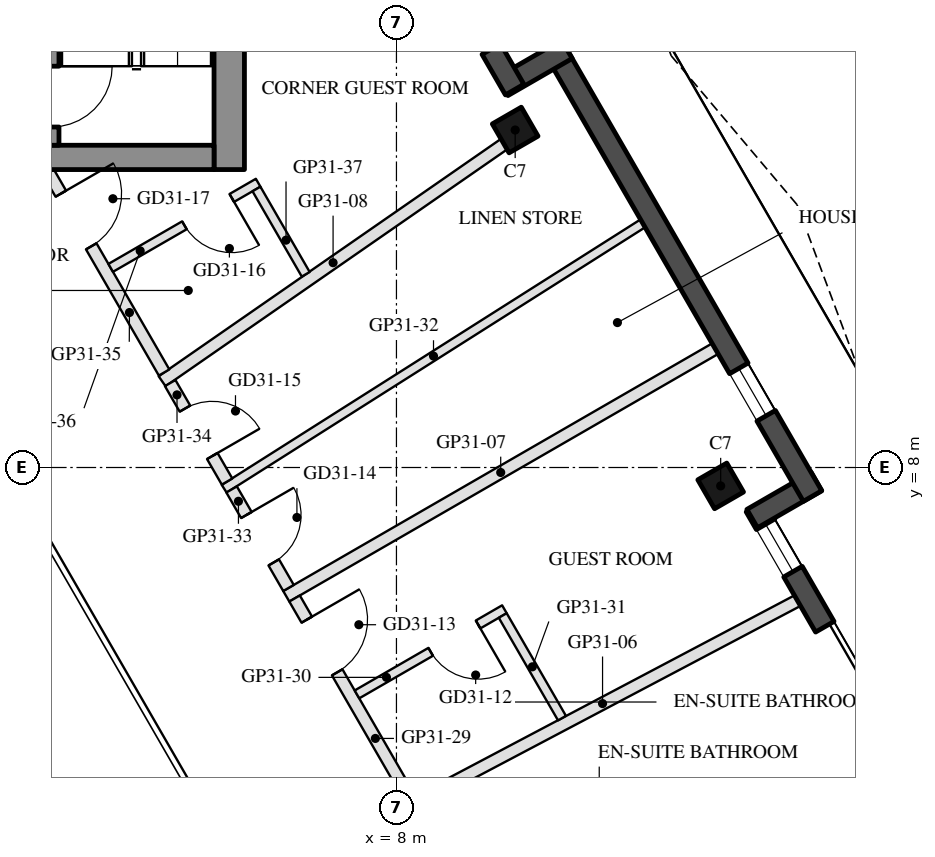
"""IFC4 building model, lengths in metres.
Left out: names, types, materials, properties, quantities, classifications, styles, units other than length and angle.
Written with IfcOpenShell. Run it as: python <this file> out.ifc"""

import sys

from ifc_helpers import new_model, si_unit, direction, frame, frame_2d, origin, origin_2d, place, context, subcontext, project, spatial, rectangle, hollow_rectangle, extrude, boolean, halfspace, element, fill, save


model = new_model("IFC4")
c1 = context("Model", 3, precision=1e-05, world=origin(), true_north=direction((0.0, 1.0)))
c2 = subcontext(c1, "Body", "Model", "MODEL_VIEW")
j1 = project(units=[si_unit("LENGTHUNIT", "METRE"), si_unit("PLANEANGLEUNIT", "RADIAN")], contexts=[c1])
p1 = place(None, origin())
s1 = spatial("IfcSite", under=j1, at=p1, CompositionType="ELEMENT")
p2 = place(p1, origin())
s2 = spatial("IfcBuilding", under=s1, at=p2, CompositionType="ELEMENT")
p3 = place(p2, frame((0.0, 0.0, 305.9)))
s3 = spatial("IfcBuildingStorey", under=s2, at=p3, CompositionType="ELEMENT", Elevation=305.9)
p4 = place(p3, frame((13.332, 7.697, 0.0), z_axis=(0.0, 0.0, 1.0), x_axis=(-0.5, 0.866025403784, 0.0)))
e1 = element("IfcColumn", 1, at=p4, inside=s3, PredefinedType="COLUMN", context=c2, shape_type="SweptSolid", body=[
    boolean("DIFFERENCE", extrude(hollow_rectangle(XDim=0.55, YDim=0.55, WallThickness=0.025, at=origin_2d()), origin(), (0.0, 0.0, 1.0), 3.7), halfspace(frame((0.0, 0.0, 3.669), z_axis=(0.0, 0.0, 1.0), x_axis=(1.0, 0.0, 0.0)), False)),
])
p5 = place(p3, frame((9.953, 13.551, 0.0), z_axis=(0.0, 0.0, 1.0), x_axis=(-0.5, 0.866025403784, 0.0)))
e2 = element("IfcColumn", 2, at=p5, inside=s3, PredefinedType="COLUMN", context=c2, shape_type="SweptSolid", body=[
    boolean("DIFFERENCE", extrude(hollow_rectangle(XDim=0.55, YDim=0.55, WallThickness=0.025, at=origin_2d()), origin(), (0.0, 0.0, 1.0), 3.7), halfspace(frame((0.0, 0.0, 3.666), z_axis=(0.0, 0.0, 1.0), x_axis=(1.0, 0.0, 0.0)), False)),
])
p6 = place(p3, frame((16.703, 2.509, 0.0), z_axis=(0.0, 0.0, 1.0), x_axis=(-0.499975351079, 0.866039634378, 0.0)))
e3 = element("IfcWall", 3, at=p6, inside=s3, PredefinedType="SOLIDWALL", context=c2, shape_type="SweptSolid", body=[
    extrude(rectangle(XDim=5.599, YDim=0.35, at=frame_2d((2.799, 0.0))), origin(), (0.0, 0.0, 1.0), 3.55),
])
p7 = place(p6, frame((0.917, 0.0, 0.0)))
e4 = element("IfcOpeningElement", 4, at=p7, cuts=e3, PredefinedType="OPENING", context=c2, shape_type="SweptSolid", body=[
    extrude(rectangle(XDim=2.4, YDim=2.4, at=frame_2d((1.2, 1.2))), frame((0.0, 0.185, 0.0), z_axis=(0.0, -1.0, 0.0), x_axis=(1.0, 0.0, 0.0)), (0.0, 0.0, 1.0), 0.37),
])
p8 = place(p6, frame((4.363, 0.0, 0.3)))
e5 = element("IfcOpeningElement", 5, at=p8, cuts=e3, PredefinedType="OPENING", context=c2, shape_type="SweptSolid", body=[
    extrude(rectangle(XDim=0.9, YDim=2.65, at=frame_2d((0.45, 1.325))), frame((0.0, 0.185, 0.0), z_axis=(0.0, -1.0, 0.0), x_axis=(1.0, 0.0, 0.0)), (0.0, 0.0, 1.0), 0.37),
])
p9 = place(p3, frame((13.85, 7.159, 0.0), z_axis=(0.0, 0.0, 1.0), x_axis=(0.866005645448, 0.500034220881, 0.0)))
e6 = element("IfcWall", 6, at=p9, inside=s3, PredefinedType="SOLIDWALL", context=c2, shape_type="SweptSolid", body=[
    extrude(rectangle(XDim=1.22, YDim=0.35, at=frame_2d((0.61, 0.0))), origin(), (0.0, 0.0, 1.0), 3.55),
])
p10 = place(p3, frame((14.843, 7.531, 0.0), z_axis=(0.0, 0.0, 1.0), x_axis=(-0.500013816581, 0.866017426631, 0.0)))
e7 = element("IfcWall", 7, at=p10, inside=s3, PredefinedType="SOLIDWALL", context=c2, shape_type="SweptSolid", body=[
    extrude(rectangle(XDim=8.559, YDim=0.35, at=frame_2d((4.279, 0.0))), origin(), (0.0, 0.0, 1.0), 3.55),
])
p11 = place(p10, frame((1.525, 0.0, 0.3)))
e8 = element("IfcOpeningElement", 8, at=p11, cuts=e7, PredefinedType="OPENING", context=c2, shape_type="SweptSolid", body=[
    extrude(rectangle(XDim=0.9, YDim=2.65, at=frame_2d((0.45, 1.325))), frame((0.0, 0.185, 0.0), z_axis=(0.0, -1.0, 0.0), x_axis=(1.0, 0.0, 0.0)), (0.0, 0.0, 1.0), 0.37),
])
p12 = place(p3, frame((10.802, 14.879, 0.0), z_axis=(0.0, 0.0, 1.0), x_axis=(-0.866005645448, -0.500034220881, 0.0)))
e9 = element("IfcWall", 9, at=p12, inside=s3, PredefinedType="SOLIDWALL", context=c2, shape_type="SweptSolid", body=[
    extrude(rectangle(XDim=1.22, YDim=0.35, at=frame_2d((0.61, 0.0))), origin(), (0.0, 0.0, 1.0), 3.55),
])
p13 = place(p3, frame((9.944, 14.216, 0.0), z_axis=(0.0, 0.0, 1.0), x_axis=(-0.500026936782, 0.866009851268, 0.0)))
e10 = element("IfcWall", 10, at=p13, inside=s3, PredefinedType="SOLIDWALL", context=c2, shape_type="SweptSolid", body=[
    extrude(rectangle(XDim=5.599, YDim=0.35, at=frame_2d((2.799, 0.0))), origin(), (0.0, 0.0, 1.0), 3.55),
])
p14 = place(p13, frame((0.77, 0.0, 0.0)))
e11 = element("IfcOpeningElement", 11, at=p14, cuts=e10, PredefinedType="OPENING", context=c2, shape_type="SweptSolid", body=[
    extrude(rectangle(XDim=2.4, YDim=2.4, at=frame_2d((1.2, 1.2))), frame((0.0, 0.185, 0.0), z_axis=(0.0, -1.0, 0.0), x_axis=(1.0, 0.0, 0.0)), (0.0, 0.0, 1.0), 0.37),
])
p15 = place(p13, frame((3.47, 0.0, 0.3)))
e12 = element("IfcOpeningElement", 12, at=p15, cuts=e10, PredefinedType="OPENING", context=c2, shape_type="SweptSolid", body=[
    extrude(rectangle(XDim=1.8, YDim=2.65, at=frame_2d((0.9, 1.325))), frame((0.0, 0.185, 0.0), z_axis=(0.0, -1.0, 0.0), x_axis=(1.0, 0.0, 0.0)), (0.0, 0.0, 1.0), 0.37),
])
p16 = place(p3, frame((5.25, 12.9, 0.0), z_axis=(0.0, 0.0, 1.0), x_axis=(0.0, 1.0, 0.0)))
e13 = element("IfcWall", 13, at=p16, inside=s3, PredefinedType="SHEAR", context=c2, shape_type="SweptSolid", body=[
    extrude(rectangle(XDim=10.299, YDim=0.5, at=frame_2d((5.149, 0.0))), origin(), (0.0, 0.0, 1.0), 3.5),
])
p17 = place(p3, frame((5.0, 13.1, 0.0), z_axis=(0.0, 0.0, 1.0), x_axis=(-1.0, 0.0, 0.0)))
e14 = element("IfcWall", 14, at=p17, inside=s3, PredefinedType="SHEAR", context=c2, shape_type="SweptSolid", body=[
    extrude(rectangle(XDim=10.0, YDim=0.4, at=frame_2d((5.0, 0.0))), origin(), (0.0, 0.0, 1.0), 3.5),
])
p18 = place(p17, frame((3.55, 0.0, 0.0)))
e15 = element("IfcOpeningElement", 15, at=p18, cuts=e14, PredefinedType="OPENING", context=c2, shape_type="SweptSolid", body=[
    extrude(rectangle(XDim=1.1, YDim=2.1, at=frame_2d((0.55, 1.05))), frame((0.0, 0.21, 0.0), z_axis=(0.0, -1.0, 0.0), x_axis=(1.0, 0.0, 0.0)), (0.0, 0.0, 1.0), 0.42),
])
p19 = place(p17, frame((5.85, 0.0, 0.0)))
e16 = element("IfcOpeningElement", 16, at=p19, cuts=e14, PredefinedType="OPENING", context=c2, shape_type="SweptSolid", body=[
    extrude(rectangle(XDim=1.4, YDim=2.1, at=frame_2d((0.7, 1.05))), frame((0.0, 0.21, 0.0), z_axis=(0.0, -1.0, 0.0), x_axis=(1.0, 0.0, 0.0)), (0.0, 0.0, 1.0), 0.42),
])
p20 = place(p3, frame((2.325, 13.3, 0.0), z_axis=(0.0, 0.0, 1.0), x_axis=(0.0, 1.0, 0.0)))
e17 = element("IfcWall", 17, at=p20, inside=s3, PredefinedType="SHEAR", context=c2, shape_type="SweptSolid", body=[
    extrude(rectangle(XDim=6.45, YDim=0.25, at=frame_2d((3.225, 0.0))), origin(), (0.0, 0.0, 1.0), 3.5),
])
p21 = place(p20, frame((0.3, 0.0, 0.0)))
e18 = element("IfcOpeningElement", 18, at=p21, cuts=e17, PredefinedType="OPENING", context=c2, shape_type="SweptSolid", body=[
    extrude(rectangle(XDim=1.0, YDim=2.1, at=frame_2d((0.5, 1.05))), frame((0.0, 0.135, 0.0), z_axis=(0.0, -1.0, 0.0), x_axis=(1.0, 0.0, 0.0)), (0.0, 0.0, 1.0), 0.27),
])
p22 = place(p3, frame((14.595, 5.81, 0.0), z_axis=(0.0, 0.0, 1.0), x_axis=(-0.884286267242, -0.46694517619, 0.0)))
e19 = element("IfcWall", 19, at=p22, inside=s3, PredefinedType="PARTITIONING", context=c2, shape_type="SweptSolid", body=[
    extrude(rectangle(XDim=7.25, YDim=0.2, at=frame_2d((3.625, 0.0))), origin(), (0.0, 0.0, 1.0), 3.1),
])
p23 = place(p3, frame((13.241, 9.954, 0.0), z_axis=(0.0, 0.0, 1.0), x_axis=(-0.866028345359, -0.499994905008, 0.0)))
e20 = element("IfcWall", 20, at=p23, inside=s3, PredefinedType="PARTITIONING", context=c2, shape_type="SweptSolid", body=[
    extrude(rectangle(XDim=8.145, YDim=0.2, at=frame_2d((4.072, 0.0))), origin(), (0.0, 0.0, 1.0), 3.1),
])
p24 = place(p3, frame((9.769, 13.318, 0.0), z_axis=(0.0, 0.0, 1.0), x_axis=(-0.821728251777, -0.569879531332, 0.0)))
e21 = element("IfcWall", 21, at=p24, inside=s3, PredefinedType="PARTITIONING", context=c2, shape_type="SweptSolid", body=[
    extrude(rectangle(XDim=6.843, YDim=0.2, at=frame_2d((3.421, 0.0))), origin(), (0.0, 0.0, 1.0), 3.1),
])
p25 = place(p3, frame((6.325, 5.845, 0.0), z_axis=(0.0, 0.0, 1.0), x_axis=(0.499971120268, -0.866042076863, 0.0)))
e22 = element("IfcWall", 22, at=p25, inside=s3, PredefinedType="PARTITIONING", context=c2, shape_type="SweptSolid", body=[
    extrude(rectangle(XDim=3.796, YDim=0.2, at=frame_2d((1.898, 0.0))), origin(), (0.0, 0.0, 1.0), 3.1),
])
p26 = place(p25, frame((0.402, 0.0, 0.0)))
e23 = element("IfcOpeningElement", 23, at=p26, cuts=e22, PredefinedType="OPENING", context=c2, shape_type="SweptSolid", body=[
    extrude(rectangle(XDim=1.0, YDim=2.1, at=frame_2d((0.5, 1.05))), frame((0.0, 0.11, 0.0), z_axis=(0.0, -1.0, 0.0), x_axis=(1.0, 0.0, 0.0)), (0.0, 0.0, 1.0), 0.22),
])
p27 = place(p3, frame((9.775, 5.668, 0.0), z_axis=(0.0, 0.0, 1.0), x_axis=(-0.865996816683, -0.500049511043, 0.0)))
e24 = element("IfcWall", 24, at=p27, inside=s3, PredefinedType="PARTITIONING", context=c2, shape_type="SweptSolid", body=[
    extrude(rectangle(XDim=2.8, YDim=0.15, at=frame_2d((1.4, 0.0))), origin(), (0.0, 0.0, 1.0), 3.1),
])
p28 = place(p27, frame((0.5, 0.0, 0.0)))
e25 = element("IfcOpeningElement", 25, at=p28, cuts=e24, PredefinedType="OPENING", context=c2, shape_type="SweptSolid", body=[
    extrude(rectangle(XDim=0.9, YDim=2.1, at=frame_2d((0.45, 1.05))), frame((0.0, 0.085, 0.0), z_axis=(0.0, -1.0, 0.0), x_axis=(1.0, 0.0, 0.0)), (0.0, 0.0, 1.0), 0.17),
])
p29 = place(p3, frame((10.722, 3.878, 0.0), z_axis=(0.0, 0.0, 1.0), x_axis=(-0.49992486272, 0.866068779967, 0.0)))
e26 = element("IfcWall", 26, at=p29, inside=s3, PredefinedType="PARTITIONING", context=c2, shape_type="SweptSolid", body=[
    extrude(rectangle(XDim=1.949, YDim=0.15, at=frame_2d((0.975, 0.0))), origin(), (0.0, 0.0, 1.0), 3.1),
])
p30 = place(p3, frame((12.052, 12.015, 0.0), z_axis=(0.0, 0.0, 1.0), x_axis=(-0.844566720388, -0.535450328987, 0.0)))
e27 = element("IfcWall", 27, at=p30, inside=s3, PredefinedType="PARTITIONING", context=c2, shape_type="SweptSolid", body=[
    extrude(rectangle(XDim=8.152, YDim=0.15, at=frame_2d((4.076, 0.0))), origin(), (0.0, 0.0, 1.0), 3.1),
])
p31 = place(p3, frame((5.289, 7.639, 0.0), z_axis=(0.0, 0.0, 1.0), x_axis=(0.499970989427, -0.866042152399, 0.0)))
e28 = element("IfcWall", 28, at=p31, inside=s3, PredefinedType="PARTITIONING", context=c2, shape_type="SweptSolid", body=[
    extrude(rectangle(XDim=1.871, YDim=0.2, at=frame_2d((0.935, 0.0))), origin(), (0.0, 0.0, 1.0), 3.1),
])
p32 = place(p31, frame((0.486, 0.0, 0.0)))
e29 = element("IfcOpeningElement", 29, at=p32, cuts=e28, PredefinedType="OPENING", context=c2, shape_type="SweptSolid", body=[
    extrude(rectangle(XDim=0.9, YDim=2.1, at=frame_2d((0.45, 1.05))), frame((0.0, 0.11, 0.0), z_axis=(0.0, -1.0, 0.0), x_axis=(1.0, 0.0, 0.0)), (0.0, 0.0, 1.0), 0.22),
])
p33 = place(p3, frame((4.279, 9.389, 0.0), z_axis=(0.0, 0.0, 1.0), x_axis=(0.500027503603, -0.86600952399, 0.0)))
e30 = element("IfcWall", 30, at=p33, inside=s3, PredefinedType="PARTITIONING", context=c2, shape_type="SweptSolid", body=[
    extrude(rectangle(XDim=1.871, YDim=0.2, at=frame_2d((0.935, 0.0))), origin(), (0.0, 0.0, 1.0), 3.55),
])
p34 = place(p33, frame((0.485, 0.0, 0.0)))
e31 = element("IfcOpeningElement", 31, at=p34, cuts=e30, PredefinedType="OPENING", context=c2, shape_type="SweptSolid", body=[
    extrude(rectangle(XDim=0.9, YDim=2.1, at=frame_2d((0.45, 1.05))), frame((0.0, 0.11, 0.0), z_axis=(0.0, -1.0, 0.0), x_axis=(1.0, 0.0, 0.0)), (0.0, 0.0, 1.0), 0.22),
])
p35 = place(p3, frame((2.281, 12.85, 0.0), z_axis=(0.0, 0.0, 1.0), x_axis=(0.500019354728, -0.866014229038, 0.0)))
e32 = element("IfcWall", 32, at=p35, inside=s3, PredefinedType="PARTITIONING", context=c2, shape_type="SweptSolid", body=[
    extrude(rectangle(XDim=3.796, YDim=0.2, at=frame_2d((1.898, 0.0))), origin(), (0.0, 0.0, 1.0), 3.1),
])
p36 = place(p35, frame((0.4, 0.0, 0.0)))
e33 = element("IfcOpeningElement", 33, at=p36, cuts=e32, PredefinedType="OPENING", context=c2, shape_type="SweptSolid", body=[
    extrude(rectangle(XDim=1.0, YDim=2.1, at=frame_2d((0.5, 1.05))), frame((0.0, 0.11, 0.0), z_axis=(0.0, -1.0, 0.0), x_axis=(1.0, 0.0, 0.0)), (0.0, 0.0, 1.0), 0.22),
])
p37 = place(p3, frame((5.725, 12.683, 0.0), z_axis=(0.0, 0.0, 1.0), x_axis=(-0.866034573852, -0.49998411664, 0.0)))
e34 = element("IfcWall", 34, at=p37, inside=s3, PredefinedType="PARTITIONING", context=c2, shape_type="SweptSolid", body=[
    extrude(rectangle(XDim=2.8, YDim=0.15, at=frame_2d((1.4, 0.0))), origin(), (0.0, 0.0, 1.0), 3.55),
])
p38 = place(p37, frame((0.5, 0.0, 0.0)))
e35 = element("IfcOpeningElement", 35, at=p38, cuts=e34, PredefinedType="OPENING", context=c2, shape_type="SweptSolid", body=[
    extrude(rectangle(XDim=0.9, YDim=2.1, at=frame_2d((0.45, 1.05))), frame((0.0, 0.085, 0.0), z_axis=(0.0, -1.0, 0.0), x_axis=(1.0, 0.0, 0.0)), (0.0, 0.0, 1.0), 0.17),
])
p39 = place(p3, frame((6.508, 11.178, 0.0), z_axis=(0.0, 0.0, 1.0), x_axis=(-0.500061642096, 0.865989811779, 0.0)))
e36 = element("IfcWall", 36, at=p39, inside=s3, PredefinedType="PARTITIONING", context=c2, shape_type="SweptSolid", body=[
    extrude(rectangle(XDim=1.62, YDim=0.15, at=frame_2d((0.81, 0.0))), origin(), (0.0, 0.0, 1.0), 3.1),
])
p40 = place(p7, frame((2.4, 0.0, 0.0), z_axis=(0.0, 0.0, 1.0), x_axis=(-1.0, 0.0, 0.0)))
e37 = element("IfcDoor", 37, at=p40, inside=s3, OperationType="SLIDING_TO_LEFT", PredefinedType="DOOR", context=c2, shape_type="SweptSolid", body=[
    extrude(rectangle(XDim=2.4, YDim=2.4, at=frame_2d((1.2, 1.2))), frame((0.0, 0.025, 0.0), z_axis=(0.0, -1.0, 0.0), x_axis=(1.0, 0.0, 0.0)), (0.0, 0.0, 1.0), 0.05),
])
fill(e4, e37)
p41 = place(p8, origin())
e38 = element("IfcWindow", 38, at=p41, inside=s3, PartitioningType="SINGLE_PANEL", PredefinedType="WINDOW", context=c2, shape_type="SweptSolid", body=[
    extrude(rectangle(XDim=0.9, YDim=2.65, at=frame_2d((0.45, 1.325))), frame((0.0, 0.03, 0.0), z_axis=(0.0, -1.0, 0.0), x_axis=(1.0, 0.0, 0.0)), (0.0, 0.0, 1.0), 0.06),
])
fill(e5, e38)
p42 = place(p11, origin())
e39 = element("IfcWindow", 39, at=p42, inside=s3, PartitioningType="SINGLE_PANEL", PredefinedType="WINDOW", context=c2, shape_type="SweptSolid", body=[
    extrude(rectangle(XDim=0.9, YDim=2.65, at=frame_2d((0.45, 1.325))), frame((0.0, 0.03, 0.0), z_axis=(0.0, -1.0, 0.0), x_axis=(1.0, 0.0, 0.0)), (0.0, 0.0, 1.0), 0.06),
])
fill(e8, e39)
p43 = place(p21, frame((1.0, 0.0, 0.0), z_axis=(0.0, 0.0, 1.0), x_axis=(-1.0, 0.0, 0.0)))
e40 = element("IfcDoor", 40, at=p43, inside=s3, OperationType="SINGLE_SWING_LEFT", PredefinedType="DOOR", context=c2, shape_type="SweptSolid", body=[
    extrude(rectangle(XDim=1.0, YDim=2.1, at=frame_2d((0.5, 1.05))), frame((0.0, 0.025, 0.0), z_axis=(0.0, -1.0, 0.0), x_axis=(1.0, 0.0, 0.0)), (0.0, 0.0, 1.0), 0.05),
])
fill(e18, e40)
p44 = place(p28, origin())
e41 = element("IfcDoor", 41, at=p44, inside=s3, OperationType="SINGLE_SWING_LEFT", PredefinedType="DOOR", context=c2, shape_type="SweptSolid", body=[
    extrude(rectangle(XDim=0.9, YDim=2.1, at=frame_2d((0.45, 1.05))), frame((0.0, 0.025, 0.0), z_axis=(0.0, -1.0, 0.0), x_axis=(1.0, 0.0, 0.0)), (0.0, 0.0, 1.0), 0.05),
])
fill(e25, e41)
p45 = place(p26, origin())
e42 = element("IfcDoor", 42, at=p45, inside=s3, OperationType="SINGLE_SWING_LEFT", PredefinedType="DOOR", context=c2, shape_type="SweptSolid", body=[
    extrude(rectangle(XDim=1.0, YDim=2.1, at=frame_2d((0.5, 1.05))), frame((0.0, 0.025, 0.0), z_axis=(0.0, -1.0, 0.0), x_axis=(1.0, 0.0, 0.0)), (0.0, 0.0, 1.0), 0.05),
])
fill(e23, e42)
p46 = place(p32, origin())
e43 = element("IfcDoor", 43, at=p46, inside=s3, OperationType="SINGLE_SWING_LEFT", PredefinedType="DOOR", context=c2, shape_type="SweptSolid", body=[
    extrude(rectangle(XDim=0.9, YDim=2.1, at=frame_2d((0.45, 1.05))), frame((0.0, 0.025, 0.0), z_axis=(0.0, -1.0, 0.0), x_axis=(1.0, 0.0, 0.0)), (0.0, 0.0, 1.0), 0.05),
])
fill(e29, e43)
p47 = place(p34, origin())
e44 = element("IfcDoor", 44, at=p47, inside=s3, OperationType="SINGLE_SWING_RIGHT", PredefinedType="DOOR", context=c2, shape_type="SweptSolid", body=[
    extrude(rectangle(XDim=0.9, YDim=2.1, at=frame_2d((0.45, 1.05))), frame((0.0, 0.025, 0.0), z_axis=(0.0, -1.0, 0.0), x_axis=(1.0, 0.0, 0.0)), (0.0, 0.0, 1.0), 0.05),
])
fill(e31, e44)
p48 = place(p38, origin())
e45 = element("IfcDoor", 45, at=p48, inside=s3, OperationType="SINGLE_SWING_LEFT", PredefinedType="DOOR", context=c2, shape_type="SweptSolid", body=[
    extrude(rectangle(XDim=0.9, YDim=2.1, at=frame_2d((0.45, 1.05))), frame((0.0, 0.025, 0.0), z_axis=(0.0, -1.0, 0.0), x_axis=(1.0, 0.0, 0.0)), (0.0, 0.0, 1.0), 0.05),
])
fill(e35, e45)
p49 = place(p36, origin())
e46 = element("IfcDoor", 46, at=p49, inside=s3, OperationType="SINGLE_SWING_LEFT", PredefinedType="DOOR", context=c2, shape_type="SweptSolid", body=[
    extrude(rectangle(XDim=1.0, YDim=2.1, at=frame_2d((0.5, 1.05))), frame((0.0, 0.025, 0.0), z_axis=(0.0, -1.0, 0.0), x_axis=(1.0, 0.0, 0.0)), (0.0, 0.0, 1.0), 0.05),
])
fill(e33, e46)
save(model, sys.argv[1])
